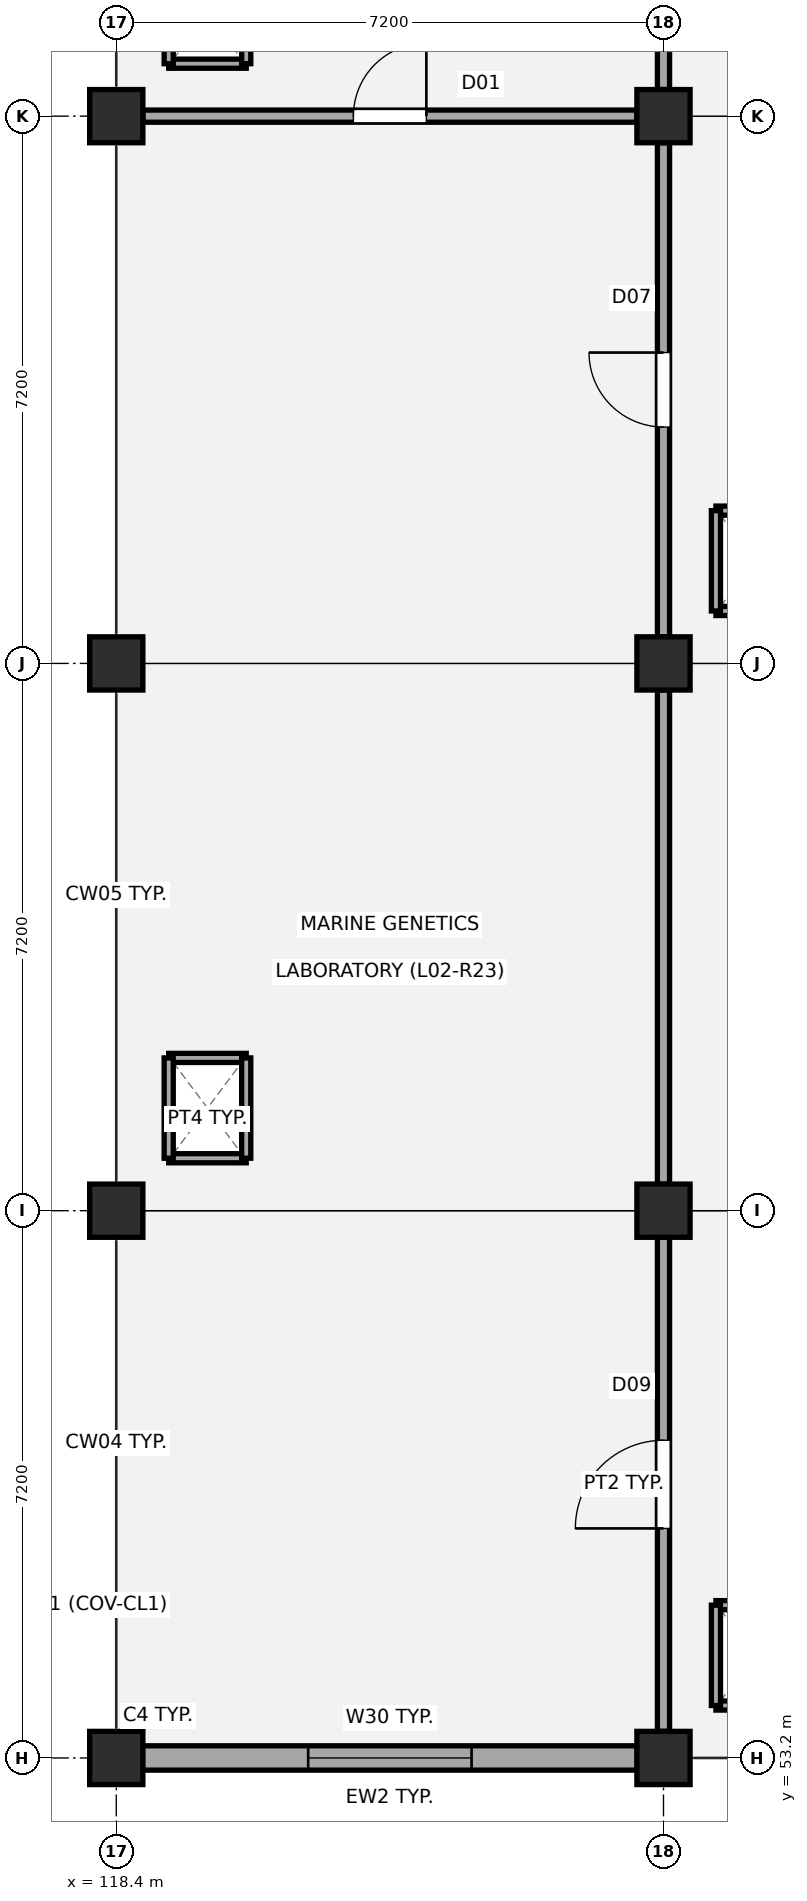
"""IFC4 building model, lengths in metres.
Left out: names, types, materials, properties, quantities, classifications, styles, units other than length and angle.
Written with IfcOpenShell. Run it as: python <this file> out.ifc"""

import sys

from ifc_helpers import new_model, si_unit, direction, frame, frame_2d, origin, origin_2d, place, context, subcontext, project, spatial, rectangle, extrude, element, fill, save


model = new_model("IFC4")
c1 = context("Model", 3, precision=1e-05, world=origin(), true_north=direction((0.0, 1.0)))
c2 = subcontext(c1, "Body", "Model", "MODEL_VIEW")
j1 = project(units=[si_unit("LENGTHUNIT", "METRE"), si_unit("PLANEANGLEUNIT", "RADIAN")], contexts=[c1])
p1 = place(None, origin())
s1 = spatial("IfcSite", under=j1, at=p1, CompositionType="ELEMENT")
p2 = place(p1, origin())
s2 = spatial("IfcBuilding", under=s1, at=p2, CompositionType="ELEMENT")
p3 = place(p2, frame((0.0, 0.0, 9.18)))
s3 = spatial("IfcBuildingStorey", under=s2, at=p3, CompositionType="ELEMENT", Elevation=9.18)
for number, where, z_axis, x_axis in (
    (1, (118.4, 53.2, 0.0), (0.0, 0.0, 1.0), (1.0, 0.0, 0.0)),
    (2, (118.4, 60.4, 0.0), (0.0, 0.0, 1.0), (1.0, 0.0, 0.0)),
    (3, (118.4, 67.6, 0.0), (0.0, 0.0, 1.0), (1.0, 0.0, 0.0)),
    (4, (118.4, 74.8, 0.0), (0.0, 0.0, 1.0), (1.0, 0.0, 0.0)),
    (5, (125.6, 53.2, 0.0), (0.0, 0.0, 1.0), (1.0, 0.0, 0.0)),
    (6, (125.6, 60.4, 0.0), (0.0, 0.0, 1.0), (1.0, 0.0, 0.0)),
    (7, (125.6, 67.6, 0.0), (0.0, 0.0, 1.0), (1.0, 0.0, 0.0)),
    (8, (125.6, 74.8, 0.0), (0.0, 0.0, 1.0), (1.0, 0.0, 0.0)),
):
    element("IfcColumn", number, at=place(p3, frame(where, z_axis=z_axis, x_axis=x_axis)), inside=s3, PredefinedType="COLUMN", context=c2, shape_type="SweptSolid", body=[
        extrude(rectangle(XDim=0.7, YDim=0.7, at=origin_2d()), origin(), (0.0, 0.0, 1.0), 4.32),
    ])
p4 = place(p3, frame((125.255, 53.2, 0.0), z_axis=(0.0, 0.0, 1.0), x_axis=(-1.0, 0.0, 0.0)))
e9 = element("IfcWall", 9, at=p4, inside=s3, PredefinedType="STANDARD", context=c2, shape_type="SweptSolid", body=[
    extrude(rectangle(XDim=6.51, YDim=0.32, at=frame_2d((3.255, 0.0))), origin(), (0.0, 0.0, 1.0), 3.48),
])
p5 = place(p4, frame((2.18, 0.0, 0.95)))
e10 = element("IfcOpeningElement", 10, at=p5, cuts=e9, PredefinedType="OPENING", context=c2, shape_type="SweptSolid", body=[
    extrude(rectangle(XDim=2.15, YDim=1.4, at=frame_2d((1.075, 0.7))), frame((0.0, 0.17, 0.0), z_axis=(0.0, -1.0, 0.0), x_axis=(1.0, 0.0, 0.0)), (0.0, 0.0, 1.0), 0.34),
])
for number, where, z_axis, x_axis in (
    (11, (119.09, 61.09, 0.0), (0.0, 0.0, 1.0), (1.0, 0.0, 0.0)),
    (12, (119.09, 62.41, 0.0), (0.0, 0.0, 1.0), (1.0, 0.0, 0.0)),
):
    element("IfcWall", number, at=place(p3, frame(where, z_axis=z_axis, x_axis=x_axis)), inside=s3, PredefinedType="PARTITIONING", context=c2, shape_type="SweptSolid", body=[
        extrude(rectangle(XDim=1.02, YDim=0.12, at=frame_2d((0.51, 0.0))), origin(), (0.0, 0.0, 1.0), 4.0),
    ])
for number, where, z_axis, x_axis in (
    (13, (119.09, 61.09, 0.0), (0.0, 0.0, 1.0), (0.0, 1.0, 0.0)),
    (14, (120.11, 61.09, 0.0), (0.0, 0.0, 1.0), (0.0, 1.0, 0.0)),
):
    element("IfcWall", number, at=place(p3, frame(where, z_axis=z_axis, x_axis=x_axis)), inside=s3, PredefinedType="PARTITIONING", context=c2, shape_type="SweptSolid", body=[
        extrude(rectangle(XDim=1.32, YDim=0.12, at=frame_2d((0.66, 0.0))), origin(), (0.0, 0.0, 1.0), 4.0),
    ])
p6 = place(p3, frame((119.09, 75.49, 0.0), z_axis=(0.0, 0.0, 1.0), x_axis=(1.0, 0.0, 0.0)))
e15 = element("IfcWall", 15, at=p6, inside=s3, PredefinedType="PARTITIONING", context=c2, shape_type="SweptSolid", body=[
    extrude(rectangle(XDim=1.02, YDim=0.12, at=frame_2d((0.51, 0.0))), origin(), (0.0, 0.0, 1.0), 4.0),
])
for number, where, z_axis, x_axis in (
    (16, (119.09, 75.49, 0.0), (0.0, 0.0, 1.0), (0.0, 1.0, 0.0)),
    (17, (120.11, 75.49, 0.0), (0.0, 0.0, 1.0), (0.0, 1.0, 0.0)),
):
    element("IfcWall", number, at=place(p3, frame(where, z_axis=z_axis, x_axis=x_axis)), inside=s3, PredefinedType="PARTITIONING", context=c2, shape_type="SweptSolid", body=[
        extrude(rectangle(XDim=1.32, YDim=0.12, at=frame_2d((0.66, 0.0))), origin(), (0.0, 0.0, 1.0), 4.0),
    ])
for number, where, z_axis, x_axis in (
    (18, (126.29, 53.89, 0.0), (0.0, 0.0, 1.0), (1.0, 0.0, 0.0)),
    (19, (126.29, 55.21, 0.0), (0.0, 0.0, 1.0), (1.0, 0.0, 0.0)),
):
    element("IfcWall", number, at=place(p3, frame(where, z_axis=z_axis, x_axis=x_axis)), inside=s3, PredefinedType="PARTITIONING", context=c2, shape_type="SweptSolid", body=[
        extrude(rectangle(XDim=1.02, YDim=0.12, at=frame_2d((0.51, 0.0))), origin(), (0.0, 0.0, 1.0), 4.02),
    ])
p7 = place(p3, frame((126.29, 53.89, 0.0), z_axis=(0.0, 0.0, 1.0), x_axis=(0.0, 1.0, 0.0)))
e20 = element("IfcWall", 20, at=p7, inside=s3, PredefinedType="PARTITIONING", context=c2, shape_type="SweptSolid", body=[
    extrude(rectangle(XDim=1.32, YDim=0.12, at=frame_2d((0.66, 0.0))), origin(), (0.0, 0.0, 1.0), 4.02),
])
for number, where, z_axis, x_axis in (
    (21, (126.29, 68.29, 0.0), (0.0, 0.0, 1.0), (1.0, 0.0, 0.0)),
    (22, (126.29, 69.61, 0.0), (0.0, 0.0, 1.0), (1.0, 0.0, 0.0)),
):
    element("IfcWall", number, at=place(p3, frame(where, z_axis=z_axis, x_axis=x_axis)), inside=s3, PredefinedType="PARTITIONING", context=c2, shape_type="SweptSolid", body=[
        extrude(rectangle(XDim=1.02, YDim=0.12, at=frame_2d((0.51, 0.0))), origin(), (0.0, 0.0, 1.0), 4.0),
    ])
p8 = place(p3, frame((126.29, 68.29, 0.0), z_axis=(0.0, 0.0, 1.0), x_axis=(0.0, 1.0, 0.0)))
e23 = element("IfcWall", 23, at=p8, inside=s3, PredefinedType="PARTITIONING", context=c2, shape_type="SweptSolid", body=[
    extrude(rectangle(XDim=1.32, YDim=0.12, at=frame_2d((0.66, 0.0))), origin(), (0.0, 0.0, 1.0), 4.0),
])
p9 = place(p3, frame((125.6, 53.55, 0.0), z_axis=(0.0, 0.0, 1.0), x_axis=(0.0, 1.0, 0.0)))
e24 = element("IfcWall", 24, at=p9, inside=s3, PredefinedType="PARTITIONING", context=c2, shape_type="SweptSolid", body=[
    extrude(rectangle(XDim=6.5, YDim=0.16, at=frame_2d((3.25, 0.0))), origin(), (0.0, 0.0, 1.0), 3.43),
])
p10 = place(p9, frame((2.67, 0.0, 0.0)))
e25 = element("IfcOpeningElement", 25, at=p10, cuts=e24, PredefinedType="OPENING", context=c2, shape_type="SweptSolid", body=[
    extrude(rectangle(XDim=1.16, YDim=2.18, at=frame_2d((0.58, 1.09))), frame((0.0, 0.09, 0.0), z_axis=(0.0, -1.0, 0.0), x_axis=(1.0, 0.0, 0.0)), (0.0, 0.0, 1.0), 0.18),
])
p11 = place(p3, frame((125.6, 60.75, 0.0), z_axis=(0.0, 0.0, 1.0), x_axis=(0.0, 1.0, 0.0)))
e26 = element("IfcWall", 26, at=p11, inside=s3, PredefinedType="PARTITIONING", context=c2, shape_type="SweptSolid", body=[
    extrude(rectangle(XDim=6.5, YDim=0.16, at=frame_2d((3.25, 0.0))), origin(), (0.0, 0.0, 1.0), 3.36),
])
p12 = place(p3, frame((125.6, 67.95, 0.0), z_axis=(0.0, 0.0, 1.0), x_axis=(0.0, 1.0, 0.0)))
e27 = element("IfcWall", 27, at=p12, inside=s3, PredefinedType="PARTITIONING", context=c2, shape_type="SweptSolid", body=[
    extrude(rectangle(XDim=6.5, YDim=0.16, at=frame_2d((3.25, 0.0))), origin(), (0.0, 0.0, 1.0), 3.41),
])
p13 = place(p12, frame((2.76, 0.0, 0.0)))
e28 = element("IfcOpeningElement", 28, at=p13, cuts=e27, PredefinedType="OPENING", context=c2, shape_type="SweptSolid", body=[
    extrude(rectangle(XDim=0.98, YDim=2.12, at=frame_2d((0.49, 1.06))), frame((0.0, 0.09, 0.0), z_axis=(0.0, -1.0, 0.0), x_axis=(1.0, 0.0, 0.0)), (0.0, 0.0, 1.0), 0.18),
])
p14 = place(p3, frame((118.75, 74.8, 0.0), z_axis=(0.0, 0.0, 1.0), x_axis=(1.0, 0.0, 0.0)))
e29 = element("IfcWall", 29, at=p14, inside=s3, PredefinedType="PARTITIONING", context=c2, shape_type="SweptSolid", body=[
    extrude(rectangle(XDim=6.5, YDim=0.16, at=frame_2d((3.25, 0.0))), origin(), (0.0, 0.0, 1.0), 3.36),
])
p15 = place(p14, frame((2.77, 0.0, 0.0)))
e30 = element("IfcOpeningElement", 30, at=p15, cuts=e29, PredefinedType="OPENING", context=c2, shape_type="SweptSolid", body=[
    extrude(rectangle(XDim=0.96, YDim=2.1, at=frame_2d((0.48, 1.05))), frame((0.0, 0.09, 0.0), z_axis=(0.0, -1.0, 0.0), x_axis=(1.0, 0.0, 0.0)), (0.0, 0.0, 1.0), 0.18),
])
p16 = place(p3, frame((125.6, 75.15, 0.0), z_axis=(0.0, 0.0, 1.0), x_axis=(0.0, 1.0, 0.0)))
e31 = element("IfcWall", 31, at=p16, inside=s3, PredefinedType="PARTITIONING", context=c2, shape_type="SweptSolid", body=[
    extrude(rectangle(XDim=6.5, YDim=0.16, at=frame_2d((3.25, 0.0))), origin(), (0.0, 0.0, 1.0), 3.36),
])
p17 = place(p16, frame((2.67, 0.0, 0.0)))
e32 = element("IfcOpeningElement", 32, at=p17, cuts=e31, PredefinedType="OPENING", context=c2, shape_type="SweptSolid", body=[
    extrude(rectangle(XDim=1.16, YDim=2.18, at=frame_2d((0.58, 1.09))), frame((0.0, 0.09, 0.0), z_axis=(0.0, -1.0, 0.0), x_axis=(1.0, 0.0, 0.0)), (0.0, 0.0, 1.0), 0.18),
])
p18 = place(p5, origin())
e33 = element("IfcWindow", 33, at=p18, inside=s3, PartitioningType="SINGLE_PANEL", PredefinedType="WINDOW", context=c2, shape_type="SweptSolid", body=[
    extrude(rectangle(XDim=2.15, YDim=1.4, at=frame_2d((1.075, 0.7))), frame((0.0, 0.03, 0.0), z_axis=(0.0, -1.0, 0.0), x_axis=(1.0, 0.0, 0.0)), (0.0, 0.0, 1.0), 0.06),
])
fill(e10, e33)
p19 = place(p15, origin())
e34 = element("IfcDoor", 34, at=p19, inside=s3, OperationType="SINGLE_SWING_RIGHT", PredefinedType="DOOR", context=c2, shape_type="SweptSolid", body=[
    extrude(rectangle(XDim=0.96, YDim=2.1, at=frame_2d((0.48, 1.05))), frame((0.0, 0.025, 0.0), z_axis=(0.0, -1.0, 0.0), x_axis=(1.0, 0.0, 0.0)), (0.0, 0.0, 1.0), 0.05),
])
fill(e30, e34)
p20 = place(p10, origin())
e35 = element("IfcDoor", 35, at=p20, inside=s3, OperationType="SINGLE_SWING_LEFT", PredefinedType="DOOR", context=c2, shape_type="SweptSolid", body=[
    extrude(rectangle(XDim=1.16, YDim=2.18, at=frame_2d((0.58, 1.09))), frame((0.0, 0.025, 0.0), z_axis=(0.0, -1.0, 0.0), x_axis=(1.0, 0.0, 0.0)), (0.0, 0.0, 1.0), 0.05),
])
fill(e25, e35)
p21 = place(p13, origin())
e36 = element("IfcDoor", 36, at=p21, inside=s3, OperationType="SINGLE_SWING_RIGHT", PredefinedType="DOOR", context=c2, shape_type="SweptSolid", body=[
    extrude(rectangle(XDim=0.98, YDim=2.12, at=frame_2d((0.49, 1.06))), frame((0.0, 0.025, 0.0), z_axis=(0.0, -1.0, 0.0), x_axis=(1.0, 0.0, 0.0)), (0.0, 0.0, 1.0), 0.05),
])
fill(e28, e36)
save(model, sys.argv[1])
